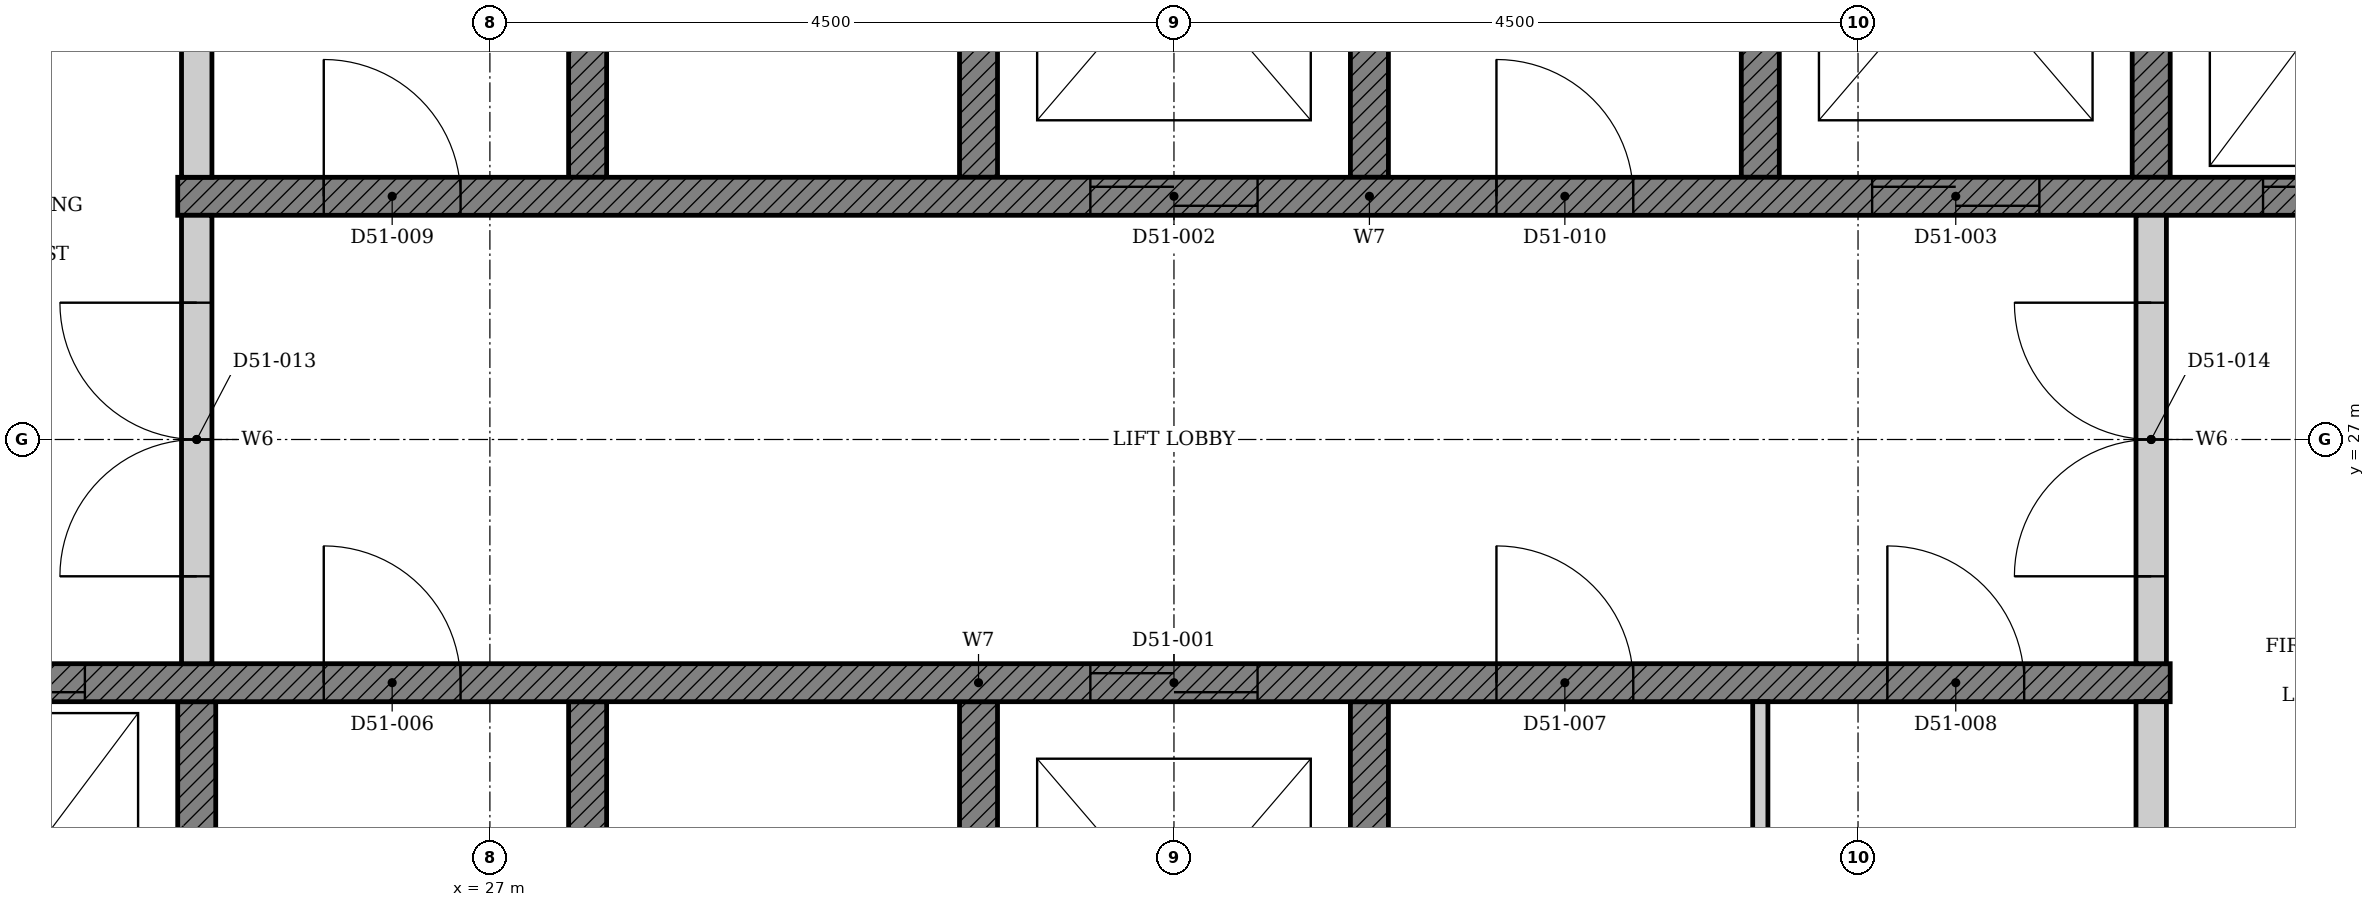
"""IFC4 building model, lengths in metres.
Left out: names, types, materials, properties, quantities, classifications, styles, units other than length and angle.
Written with IfcOpenShell. Run it as: python <this file> out.ifc"""

import sys

from ifc_helpers import new_model, si_unit, direction, frame, frame_2d, origin, place, context, subcontext, project, spatial, polyline, rectangle, outline, extrude, element, fill, save


model = new_model("IFC4")
c1 = context("Model", 3, precision=1e-05, world=origin(), true_north=direction((0.0, 1.0)))
c2 = subcontext(c1, "Body", "Model", "MODEL_VIEW")
j1 = project(units=[si_unit("LENGTHUNIT", "METRE"), si_unit("PLANEANGLEUNIT", "RADIAN")], contexts=[c1])
p1 = place(None, origin())
s1 = spatial("IfcSite", under=j1, at=p1, CompositionType="ELEMENT")
p2 = place(p1, origin())
s2 = spatial("IfcBuilding", under=s1, at=p2, CompositionType="ELEMENT")
p3 = place(p2, frame((0.0, 0.0, 203.5)))
s3 = spatial("IfcBuildingStorey", under=s2, at=p3, CompositionType="ELEMENT", Elevation=203.5)
p4 = place(p3, origin())
e1 = element("IfcWall", 1, at=p4, inside=s3, PredefinedType="SHEAR", context=c2, shape_type="SweptSolid", body=[
    extrude(outline(polyline([(22.375, 22.35), (25.197, 22.35), (25.197, 25.275), (24.947, 25.275), (24.947, 22.65), (22.625, 22.65), (22.625, 25.275), (22.375, 25.275), (22.375, 22.35)])), origin(), (0.0, 0.0, 1.0), 3.4),
])
p5 = place(p3, origin())
e2 = element("IfcWall", 2, at=p5, inside=s3, PredefinedType="SHEAR", context=c2, shape_type="SweptSolid", body=[
    extrude(outline(polyline([(27.518, 22.35), (32.911, 22.35), (32.911, 25.275), (32.661, 25.275), (32.661, 22.65), (30.339, 22.65), (30.339, 25.275), (30.089, 25.275), (30.089, 22.65), (27.768, 22.65), (27.768, 25.275), (27.518, 25.275), (27.518, 22.35)])), origin(), (0.0, 0.0, 1.0), 3.4),
])
p6 = place(p3, origin())
e3 = element("IfcWall", 3, at=p6, inside=s3, PredefinedType="SHEAR", context=c2, shape_type="SweptSolid", body=[
    extrude(outline(polyline([(27.518, 28.725), (27.768, 28.725), (27.768, 31.35), (30.089, 31.35), (30.089, 28.725), (30.339, 28.725), (30.339, 31.35), (32.661, 31.35), (32.661, 28.725), (32.911, 28.725), (32.911, 31.65), (27.518, 31.65), (27.518, 28.725)])), origin(), (0.0, 0.0, 1.0), 3.4),
])
p7 = place(p3, origin())
e4 = element("IfcWall", 4, at=p7, inside=s3, PredefinedType="SHEAR", context=c2, shape_type="SweptSolid", body=[
    extrude(outline(polyline([(35.232, 28.725), (35.482, 28.725), (35.482, 31.35), (37.803, 31.35), (37.803, 28.725), (38.053, 28.725), (38.053, 31.35), (40.375, 31.35), (40.375, 28.725), (40.625, 28.725), (40.625, 31.65), (35.232, 31.65), (35.232, 28.725)])), origin(), (0.0, 0.0, 1.0), 3.4),
])
p8 = place(p3, frame((22.375, 25.4, 0.0), z_axis=(0.0, 0.0, 1.0), x_axis=(1.0, 0.0, 0.0)))
e5 = element("IfcWall", 5, at=p8, inside=s3, PredefinedType="SHEAR", context=c2, shape_type="SweptSolid", body=[
    extrude(rectangle(XDim=15.678, YDim=0.25, at=frame_2d((7.839, 0.0))), origin(), (0.0, 0.0, 1.0), 3.4),
])
p9 = place(p8, frame((8.575, 0.0, 0.0)))
e6 = element("IfcOpeningElement", 6, at=p9, cuts=e5, PredefinedType="OPENING", context=c2, shape_type="SweptSolid", body=[
    extrude(rectangle(XDim=1.1, YDim=2.1, at=frame_2d((0.55, 1.05))), frame((0.0, 0.135, 0.0), z_axis=(0.0, -1.0, 0.0), x_axis=(1.0, 0.0, 0.0)), (0.0, 0.0, 1.0), 0.27),
])
p10 = place(p8, frame((0.861, 0.0, 0.0)))
e7 = element("IfcOpeningElement", 7, at=p10, cuts=e5, PredefinedType="OPENING", context=c2, shape_type="SweptSolid", body=[
    extrude(rectangle(XDim=1.1, YDim=2.1, at=frame_2d((0.55, 1.05))), frame((0.0, 0.135, 0.0), z_axis=(0.0, -1.0, 0.0), x_axis=(1.0, 0.0, 0.0)), (0.0, 0.0, 1.0), 0.27),
])
p11 = place(p8, frame((3.532, 0.0, 0.0)))
e8 = element("IfcOpeningElement", 8, at=p11, cuts=e5, PredefinedType="OPENING", context=c2, shape_type="SweptSolid", body=[
    extrude(rectangle(XDim=0.9, YDim=2.1, at=frame_2d((0.45, 1.05))), frame((0.0, 0.135, 0.0), z_axis=(0.0, -1.0, 0.0), x_axis=(1.0, 0.0, 0.0)), (0.0, 0.0, 1.0), 0.27),
])
p12 = place(p8, frame((11.246, 0.0, 0.0)))
e9 = element("IfcOpeningElement", 9, at=p12, cuts=e5, PredefinedType="OPENING", context=c2, shape_type="SweptSolid", body=[
    extrude(rectangle(XDim=0.9, YDim=2.1, at=frame_2d((0.45, 1.05))), frame((0.0, 0.135, 0.0), z_axis=(0.0, -1.0, 0.0), x_axis=(1.0, 0.0, 0.0)), (0.0, 0.0, 1.0), 0.27),
])
p13 = place(p8, frame((13.818, 0.0, 0.0)))
e10 = element("IfcOpeningElement", 10, at=p13, cuts=e5, PredefinedType="OPENING", context=c2, shape_type="SweptSolid", body=[
    extrude(rectangle(XDim=0.9, YDim=2.1, at=frame_2d((0.45, 1.05))), frame((0.0, 0.135, 0.0), z_axis=(0.0, -1.0, 0.0), x_axis=(1.0, 0.0, 0.0)), (0.0, 0.0, 1.0), 0.27),
])
p14 = place(p3, frame((24.947, 28.6, 0.0), z_axis=(0.0, 0.0, 1.0), x_axis=(1.0, 0.0, 0.0)))
e11 = element("IfcWall", 11, at=p14, inside=s3, PredefinedType="SHEAR", context=c2, shape_type="SweptSolid", body=[
    extrude(rectangle(XDim=15.678, YDim=0.25, at=frame_2d((7.839, 0.0))), origin(), (0.0, 0.0, 1.0), 3.4),
])
p15 = place(p14, frame((6.004, 0.0, 0.0)))
e12 = element("IfcOpeningElement", 12, at=p15, cuts=e11, PredefinedType="OPENING", context=c2, shape_type="SweptSolid", body=[
    extrude(rectangle(XDim=1.1, YDim=2.1, at=frame_2d((0.55, 1.05))), frame((0.0, 0.135, 0.0), z_axis=(0.0, -1.0, 0.0), x_axis=(1.0, 0.0, 0.0)), (0.0, 0.0, 1.0), 0.27),
])
p16 = place(p14, frame((11.146, 0.0, 0.0)))
e13 = element("IfcOpeningElement", 13, at=p16, cuts=e11, PredefinedType="OPENING", context=c2, shape_type="SweptSolid", body=[
    extrude(rectangle(XDim=1.1, YDim=2.1, at=frame_2d((0.55, 1.05))), frame((0.0, 0.135, 0.0), z_axis=(0.0, -1.0, 0.0), x_axis=(1.0, 0.0, 0.0)), (0.0, 0.0, 1.0), 0.27),
])
p17 = place(p14, frame((13.718, 0.0, 0.0)))
e14 = element("IfcOpeningElement", 14, at=p17, cuts=e11, PredefinedType="OPENING", context=c2, shape_type="SweptSolid", body=[
    extrude(rectangle(XDim=1.1, YDim=2.1, at=frame_2d((0.55, 1.05))), frame((0.0, 0.135, 0.0), z_axis=(0.0, -1.0, 0.0), x_axis=(1.0, 0.0, 0.0)), (0.0, 0.0, 1.0), 0.27),
])
p18 = place(p14, frame((0.961, 0.0, 0.0)))
e15 = element("IfcOpeningElement", 15, at=p18, cuts=e11, PredefinedType="OPENING", context=c2, shape_type="SweptSolid", body=[
    extrude(rectangle(XDim=0.9, YDim=2.1, at=frame_2d((0.45, 1.05))), frame((0.0, 0.135, 0.0), z_axis=(0.0, -1.0, 0.0), x_axis=(1.0, 0.0, 0.0)), (0.0, 0.0, 1.0), 0.27),
])
p19 = place(p14, frame((8.675, 0.0, 0.0)))
e16 = element("IfcOpeningElement", 16, at=p19, cuts=e11, PredefinedType="OPENING", context=c2, shape_type="SweptSolid", body=[
    extrude(rectangle(XDim=0.9, YDim=2.1, at=frame_2d((0.45, 1.05))), frame((0.0, 0.135, 0.0), z_axis=(0.0, -1.0, 0.0), x_axis=(1.0, 0.0, 0.0)), (0.0, 0.0, 1.0), 0.27),
])
p20 = place(p3, frame((37.928, 22.65, 0.0), z_axis=(0.0, 0.0, 1.0), x_axis=(0.0, 1.0, 0.0)))
e17 = element("IfcWall", 17, at=p20, inside=s3, PredefinedType="PARTITIONING", context=c2, shape_type="SweptSolid", body=[
    extrude(rectangle(XDim=2.625, YDim=0.2, at=frame_2d((1.312, 0.0))), origin(), (0.0, 0.0, 1.0), 3.4),
])
p21 = place(p3, frame((35.357, 22.65, 0.0), z_axis=(0.0, 0.0, 1.0), x_axis=(0.0, 1.0, 0.0)))
e18 = element("IfcWall", 18, at=p21, inside=s3, PredefinedType="PARTITIONING", context=c2, shape_type="SweptSolid", body=[
    extrude(rectangle(XDim=2.625, YDim=0.1, at=frame_2d((1.312, 0.0))), origin(), (0.0, 0.0, 1.0), 3.4),
])
p22 = place(p3, frame((25.072, 28.725, 0.0), z_axis=(0.0, 0.0, 1.0), x_axis=(0.0, 1.0, 0.0)))
e19 = element("IfcWall", 19, at=p22, inside=s3, PredefinedType="PARTITIONING", context=c2, shape_type="SweptSolid", body=[
    extrude(rectangle(XDim=2.625, YDim=0.2, at=frame_2d((1.312, 0.0))), origin(), (0.0, 0.0, 1.0), 3.4),
])
p23 = place(p3, frame((25.072, 25.525, 0.0), z_axis=(0.0, 0.0, 1.0), x_axis=(0.0, 1.0, 0.0)))
e20 = element("IfcWall", 20, at=p23, inside=s3, PredefinedType="PARTITIONING", context=c2, shape_type="SweptSolid", body=[
    extrude(rectangle(XDim=2.95, YDim=0.2, at=frame_2d((1.475, 0.0))), origin(), (0.0, 0.0, 1.0), 3.4),
])
p24 = place(p23, frame((0.575, 0.0, 0.0)))
e21 = element("IfcOpeningElement", 21, at=p24, cuts=e20, PredefinedType="OPENING", context=c2, shape_type="SweptSolid", body=[
    extrude(rectangle(XDim=1.8, YDim=2.1, at=frame_2d((0.9, 1.05))), frame((0.0, 0.11, 0.0), z_axis=(0.0, -1.0, 0.0), x_axis=(1.0, 0.0, 0.0)), (0.0, 0.0, 1.0), 0.22),
])
p25 = place(p3, frame((37.928, 25.525, 0.0), z_axis=(0.0, 0.0, 1.0), x_axis=(0.0, 1.0, 0.0)))
e22 = element("IfcWall", 22, at=p25, inside=s3, PredefinedType="PARTITIONING", context=c2, shape_type="SweptSolid", body=[
    extrude(rectangle(XDim=2.95, YDim=0.2, at=frame_2d((1.475, 0.0))), origin(), (0.0, 0.0, 1.0), 3.4),
])
p26 = place(p25, frame((0.575, 0.0, 0.0)))
e23 = element("IfcOpeningElement", 23, at=p26, cuts=e22, PredefinedType="OPENING", context=c2, shape_type="SweptSolid", body=[
    extrude(rectangle(XDim=1.8, YDim=2.1, at=frame_2d((0.9, 1.05))), frame((0.0, 0.11, 0.0), z_axis=(0.0, -1.0, 0.0), x_axis=(1.0, 0.0, 0.0)), (0.0, 0.0, 1.0), 0.22),
])
p27 = place(p9, origin())
e24 = element("IfcDoor", 24, at=p27, inside=s3, OperationType="DOUBLE_DOOR_SLIDING", PredefinedType="DOOR", context=c2, shape_type="SweptSolid", body=[
    extrude(rectangle(XDim=1.1, YDim=2.1, at=frame_2d((0.55, 1.05))), frame((0.0, 0.025, 0.0), z_axis=(0.0, -1.0, 0.0), x_axis=(1.0, 0.0, 0.0)), (0.0, 0.0, 1.0), 0.05),
])
fill(e6, e24)
p28 = place(p15, origin())
e25 = element("IfcDoor", 25, at=p28, inside=s3, OperationType="DOUBLE_DOOR_SLIDING", PredefinedType="DOOR", context=c2, shape_type="SweptSolid", body=[
    extrude(rectangle(XDim=1.1, YDim=2.1, at=frame_2d((0.55, 1.05))), frame((0.0, 0.025, 0.0), z_axis=(0.0, -1.0, 0.0), x_axis=(1.0, 0.0, 0.0)), (0.0, 0.0, 1.0), 0.05),
])
fill(e12, e25)
p29 = place(p16, origin())
e26 = element("IfcDoor", 26, at=p29, inside=s3, OperationType="DOUBLE_DOOR_SLIDING", PredefinedType="DOOR", context=c2, shape_type="SweptSolid", body=[
    extrude(rectangle(XDim=1.1, YDim=2.1, at=frame_2d((0.55, 1.05))), frame((0.0, 0.025, 0.0), z_axis=(0.0, -1.0, 0.0), x_axis=(1.0, 0.0, 0.0)), (0.0, 0.0, 1.0), 0.05),
])
fill(e13, e26)
p30 = place(p10, origin())
e27 = element("IfcDoor", 27, at=p30, inside=s3, OperationType="DOUBLE_DOOR_SLIDING", PredefinedType="DOOR", context=c2, shape_type="SweptSolid", body=[
    extrude(rectangle(XDim=1.1, YDim=2.1, at=frame_2d((0.55, 1.05))), frame((0.0, 0.025, 0.0), z_axis=(0.0, -1.0, 0.0), x_axis=(1.0, 0.0, 0.0)), (0.0, 0.0, 1.0), 0.05),
])
fill(e7, e27)
p31 = place(p17, origin())
e28 = element("IfcDoor", 28, at=p31, inside=s3, OperationType="DOUBLE_DOOR_SLIDING", PredefinedType="DOOR", context=c2, shape_type="SweptSolid", body=[
    extrude(rectangle(XDim=1.1, YDim=2.1, at=frame_2d((0.55, 1.05))), frame((0.0, 0.025, 0.0), z_axis=(0.0, -1.0, 0.0), x_axis=(1.0, 0.0, 0.0)), (0.0, 0.0, 1.0), 0.05),
])
fill(e14, e28)
p32 = place(p11, origin())
e29 = element("IfcDoor", 29, at=p32, inside=s3, OperationType="SINGLE_SWING_LEFT", PredefinedType="DOOR", context=c2, shape_type="SweptSolid", body=[
    extrude(rectangle(XDim=0.9, YDim=2.1, at=frame_2d((0.45, 1.05))), frame((0.0, 0.025, 0.0), z_axis=(0.0, -1.0, 0.0), x_axis=(1.0, 0.0, 0.0)), (0.0, 0.0, 1.0), 0.05),
])
fill(e8, e29)
p33 = place(p12, origin())
e30 = element("IfcDoor", 30, at=p33, inside=s3, OperationType="SINGLE_SWING_LEFT", PredefinedType="DOOR", context=c2, shape_type="SweptSolid", body=[
    extrude(rectangle(XDim=0.9, YDim=2.1, at=frame_2d((0.45, 1.05))), frame((0.0, 0.025, 0.0), z_axis=(0.0, -1.0, 0.0), x_axis=(1.0, 0.0, 0.0)), (0.0, 0.0, 1.0), 0.05),
])
fill(e9, e30)
p34 = place(p13, origin())
e31 = element("IfcDoor", 31, at=p34, inside=s3, OperationType="SINGLE_SWING_LEFT", PredefinedType="DOOR", context=c2, shape_type="SweptSolid", body=[
    extrude(rectangle(XDim=0.9, YDim=2.1, at=frame_2d((0.45, 1.05))), frame((0.0, 0.025, 0.0), z_axis=(0.0, -1.0, 0.0), x_axis=(1.0, 0.0, 0.0)), (0.0, 0.0, 1.0), 0.05),
])
fill(e10, e31)
p35 = place(p18, origin())
e32 = element("IfcDoor", 32, at=p35, inside=s3, OperationType="SINGLE_SWING_LEFT", PredefinedType="DOOR", context=c2, shape_type="SweptSolid", body=[
    extrude(rectangle(XDim=0.9, YDim=2.1, at=frame_2d((0.45, 1.05))), frame((0.0, 0.025, 0.0), z_axis=(0.0, -1.0, 0.0), x_axis=(1.0, 0.0, 0.0)), (0.0, 0.0, 1.0), 0.05),
])
fill(e15, e32)
p36 = place(p19, origin())
e33 = element("IfcDoor", 33, at=p36, inside=s3, OperationType="SINGLE_SWING_LEFT", PredefinedType="DOOR", context=c2, shape_type="SweptSolid", body=[
    extrude(rectangle(XDim=0.9, YDim=2.1, at=frame_2d((0.45, 1.05))), frame((0.0, 0.025, 0.0), z_axis=(0.0, -1.0, 0.0), x_axis=(1.0, 0.0, 0.0)), (0.0, 0.0, 1.0), 0.05),
])
fill(e16, e33)
p37 = place(p24, origin())
e34 = element("IfcDoor", 34, at=p37, inside=s3, OperationType="DOUBLE_DOOR_SINGLE_SWING", PredefinedType="DOOR", context=c2, shape_type="SweptSolid", body=[
    extrude(rectangle(XDim=1.8, YDim=2.1, at=frame_2d((0.9, 1.05))), frame((0.0, 0.025, 0.0), z_axis=(0.0, -1.0, 0.0), x_axis=(1.0, 0.0, 0.0)), (0.0, 0.0, 1.0), 0.05),
])
fill(e21, e34)
p38 = place(p26, origin())
e35 = element("IfcDoor", 35, at=p38, inside=s3, OperationType="DOUBLE_DOOR_SINGLE_SWING", PredefinedType="DOOR", context=c2, shape_type="SweptSolid", body=[
    extrude(rectangle(XDim=1.8, YDim=2.1, at=frame_2d((0.9, 1.05))), frame((0.0, 0.025, 0.0), z_axis=(0.0, -1.0, 0.0), x_axis=(1.0, 0.0, 0.0)), (0.0, 0.0, 1.0), 0.05),
])
fill(e23, e35)
save(model, sys.argv[1])
